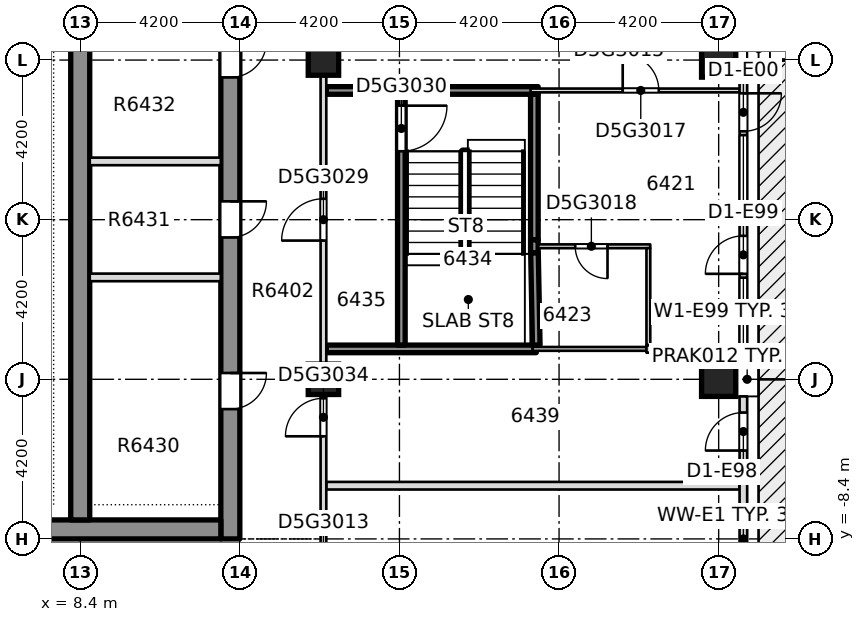
"""IFC4 building model, lengths in metres.
Left out: names, types, materials, properties, quantities, classifications, styles, units other than length and angle.
Written with IfcOpenShell. Run it as: python <this file> out.ifc"""

import sys

from ifc_helpers import new_model, si_unit, direction, frame, frame_2d, origin, origin_2d, place, context, subcontext, project, spatial, rectangle, extrude, element, fill, save


model = new_model("IFC4")
c1 = context("Model", 3, precision=1e-05, world=origin(), true_north=direction((0.0, 1.0)))
c2 = subcontext(c1, "Body", "Model", "MODEL_VIEW")
j1 = project(units=[si_unit("LENGTHUNIT", "METRE"), si_unit("PLANEANGLEUNIT", "RADIAN")], contexts=[c1])
p1 = place(None, origin())
s1 = spatial("IfcSite", under=j1, at=p1, CompositionType="ELEMENT")
p2 = place(p1, origin())
s2 = spatial("IfcBuilding", under=s1, at=p2, CompositionType="ELEMENT")
p3 = place(p2, frame((0.0, 0.0, 244.15)))
s3 = spatial("IfcBuildingStorey", under=s2, at=p3, CompositionType="ELEMENT", Elevation=244.15)
p4 = place(p3, frame((12.35, -8.4, -0.4), z_axis=(0.0, 0.0, 1.0), x_axis=(0.0, 1.0, 0.0)))
e1 = element("IfcWall", 1, at=p4, inside=s3, PredefinedType="SHEAR", context=c2, shape_type="SweptSolid", body=[
    extrude(rectangle(XDim=30.15, YDim=0.5, at=frame_2d((15.075, 0.0))), origin(), (0.0, 0.0, 1.0), 3.45),
])
p5 = place(p4, frame((3.416, 0.0, 0.4)))
e2 = element("IfcOpeningElement", 2, at=p5, cuts=e1, PredefinedType="OPENING", context=c2, shape_type="SweptSolid", body=[
    extrude(rectangle(XDim=0.95, YDim=2.1, at=frame_2d((0.475, 1.05))), frame((0.0, 0.26, 0.0), z_axis=(0.0, -1.0, 0.0), x_axis=(1.0, 0.0, 0.0)), (0.0, 0.0, 1.0), 0.52),
])
p6 = place(p4, frame((7.932, 0.0, 0.4)))
e3 = element("IfcOpeningElement", 3, at=p6, cuts=e1, PredefinedType="OPENING", context=c2, shape_type="SweptSolid", body=[
    extrude(rectangle(XDim=0.95, YDim=2.1, at=frame_2d((0.475, 1.05))), frame((0.0, 0.26, 0.0), z_axis=(0.0, -1.0, 0.0), x_axis=(1.0, 0.0, 0.0)), (0.0, 0.0, 1.0), 0.52),
])
p7 = place(p4, frame((12.144, 0.0, 0.4)))
e4 = element("IfcOpeningElement", 4, at=p7, cuts=e1, PredefinedType="OPENING", context=c2, shape_type="SweptSolid", body=[
    extrude(rectangle(XDim=0.95, YDim=2.1, at=frame_2d((0.475, 1.05))), frame((0.0, 0.26, 0.0), z_axis=(0.0, -1.0, 0.0), x_axis=(1.0, 0.0, 0.0)), (0.0, 0.0, 1.0), 0.52),
])
p8 = place(p4, frame((16.477, 0.0, 0.4)))
e5 = element("IfcOpeningElement", 5, at=p8, cuts=e1, PredefinedType="OPENING", context=c2, shape_type="SweptSolid", body=[
    extrude(rectangle(XDim=0.95, YDim=2.1, at=frame_2d((0.475, 1.05))), frame((0.0, 0.26, 0.0), z_axis=(0.0, -1.0, 0.0), x_axis=(1.0, 0.0, 0.0)), (0.0, 0.0, 1.0), 0.52),
])
p9 = place(p4, frame((23.605, 0.0, 0.4)))
e6 = element("IfcOpeningElement", 6, at=p9, cuts=e1, PredefinedType="OPENING", context=c2, shape_type="SweptSolid", body=[
    extrude(rectangle(XDim=0.95, YDim=2.1, at=frame_2d((0.475, 1.05))), frame((0.0, 0.26, 0.0), z_axis=(0.0, -1.0, 0.0), x_axis=(1.0, 0.0, 0.0)), (0.0, 0.0, 1.0), 0.52),
])
p10 = place(p4, frame((27.63, 0.0, 0.4)))
e7 = element("IfcOpeningElement", 7, at=p10, cuts=e1, PredefinedType="OPENING", context=c2, shape_type="SweptSolid", body=[
    extrude(rectangle(XDim=0.95, YDim=2.1, at=frame_2d((0.475, 1.05))), frame((0.0, 0.26, 0.0), z_axis=(0.0, -1.0, 0.0), x_axis=(1.0, 0.0, 0.0)), (0.0, 0.0, 1.0), 0.52),
])
p11 = place(p4, frame((19.3, 0.0, 0.4)))
e8 = element("IfcOpeningElement", 8, at=p11, cuts=e1, PredefinedType="OPENING", context=c2, shape_type="SweptSolid", body=[
    extrude(rectangle(XDim=1.2, YDim=2.1, at=frame_2d((0.6, 1.05))), frame((0.0, 0.26, 0.0), z_axis=(0.0, -1.0, 0.0), x_axis=(1.0, 0.0, 0.0)), (0.0, 0.0, 1.0), 0.52),
])
p12 = place(p3, frame((-12.1, -8.15, -0.4), z_axis=(0.0, 0.0, 1.0), x_axis=(1.0, 0.0, 0.0)))
e9 = element("IfcWall", 9, at=p12, inside=s3, PredefinedType="SHEAR", context=c2, shape_type="SweptSolid", body=[
    extrude(rectangle(XDim=24.2, YDim=0.5, at=frame_2d((12.1, 0.0))), origin(), (0.0, 0.0, 1.0), 3.45),
])
p13 = place(p12, frame((7.35, 0.0, 0.4)))
e10 = element("IfcOpeningElement", 10, at=p13, cuts=e9, PredefinedType="OPENING", context=c2, shape_type="SweptSolid", body=[
    extrude(rectangle(XDim=1.8, YDim=2.1, at=frame_2d((0.9, 1.05))), frame((0.0, 0.26, 0.0), z_axis=(0.0, -1.0, 0.0), x_axis=(1.0, 0.0, 0.0)), (0.0, 0.0, 1.0), 0.52),
])
p14 = place(p12, frame((15.05, 0.0, 0.4)))
e11 = element("IfcOpeningElement", 11, at=p14, cuts=e9, PredefinedType="OPENING", context=c2, shape_type="SweptSolid", body=[
    extrude(rectangle(XDim=1.8, YDim=2.1, at=frame_2d((0.9, 1.05))), frame((0.0, 0.26, 0.0), z_axis=(0.0, -1.0, 0.0), x_axis=(1.0, 0.0, 0.0)), (0.0, 0.0, 1.0), 0.52),
])
p15 = place(p3, frame((8.4, -7.9, -0.4), z_axis=(0.0, 0.0, 1.0), x_axis=(0.0, 1.0, 0.0)))
e12 = element("IfcWall", 12, at=p15, inside=s3, PredefinedType="SHEAR", context=c2, shape_type="SweptSolid", body=[
    extrude(rectangle(XDim=29.15, YDim=0.5, at=frame_2d((14.575, 0.0))), origin(), (0.0, 0.0, 1.0), 3.45),
])
p16 = place(p15, frame((18.8, 0.0, 0.4)))
e13 = element("IfcOpeningElement", 13, at=p16, cuts=e12, PredefinedType="OPENING", context=c2, shape_type="SweptSolid", body=[
    extrude(rectangle(XDim=1.2, YDim=2.1, at=frame_2d((0.6, 1.05))), frame((0.0, 0.26, 0.0), z_axis=(0.0, -1.0, 0.0), x_axis=(1.0, 0.0, 0.0)), (0.0, 0.0, 1.0), 0.52),
])
for number, where, z_axis, x_axis in (
    (14, (25.2, -4.2, -0.4), (0.0, 0.0, 1.0), (1.0, 0.0, 0.0)),
    (15, (25.2, 4.2, -0.4), (0.0, 0.0, 1.0), (1.0, 0.0, 0.0)),
):
    element("IfcColumn", number, at=place(p3, frame(where, z_axis=z_axis, x_axis=x_axis)), inside=s3, PredefinedType="COLUMN", context=c2, shape_type="SweptSolid", body=[
        extrude(rectangle(XDim=0.9, YDim=0.9, at=origin_2d()), origin(), (0.0, 0.0, 1.0), 3.45),
    ])
for number, where, z_axis, x_axis in (
    (16, (14.8, -4.2, -0.4), (0.0, 0.0, 1.0), (1.0, 0.0, 0.0)),
    (17, (14.8, 4.2, -0.4), (0.0, 0.0, 1.0), (1.0, 0.0, 0.0)),
):
    element("IfcColumn", number, at=place(p3, frame(where, z_axis=z_axis, x_axis=x_axis)), inside=s3, PredefinedType="COLUMN", context=c2, shape_type="SweptSolid", body=[
        extrude(rectangle(XDim=0.8, YDim=0.8, at=origin_2d()), origin(), (0.0, 0.0, 1.0), 3.45),
    ])
p17 = place(p3, frame((14.875, -7.0, 0.0), z_axis=(0.0, 0.0, 1.0), x_axis=(1.0, 0.0, 0.0)))
e18 = element("IfcWall", 18, at=p17, inside=s3, PredefinedType="PARTITIONING", context=c2, shape_type="SweptSolid", body=[
    extrude(rectangle(XDim=10.875, YDim=0.2, at=frame_2d((5.438, 0.0))), origin(), (0.0, 0.0, 1.0), 3.05),
])
p18 = place(p3, frame((14.875, -3.4, 0.0), z_axis=(0.0, 0.0, 1.0), x_axis=(1.0, 0.0, 0.0)))
e19 = element("IfcWall", 19, at=p18, inside=s3, PredefinedType="SOLIDWALL", context=c2, shape_type="SweptSolid", body=[
    extrude(rectangle(XDim=5.525, YDim=0.2, at=frame_2d((2.762, 0.0))), origin(), (0.0, 0.0, 1.0), 3.05),
])
p19 = place(p3, frame((20.3, -3.4, 0.0), z_axis=(0.0, 0.0, 1.0), x_axis=(1.0, 0.0, 0.0)))
e20 = element("IfcWall", 20, at=p19, inside=s3, PredefinedType="PARTITIONING", context=c2, shape_type="SweptSolid", body=[
    extrude(rectangle(XDim=3.1, YDim=0.1, at=frame_2d((1.55, 0.0))), origin(), (0.0, 0.0, 1.0), 3.05),
])
p20 = place(p3, frame((23.3, -3.4, 0.0), z_axis=(0.0, 0.0, 1.0), x_axis=(1.0, 0.0, 0.0)))
e21 = element("IfcWall", 21, at=p20, inside=s3, PredefinedType="PARTITIONING", context=c2, shape_type="SweptSolid", body=[
    extrude(rectangle(XDim=2.45, YDim=0.2, at=frame_2d((1.225, 0.0))), origin(), (0.0, 0.0, 1.0), 3.05),
])
p21 = place(p3, frame((20.45, -0.7, 0.0), z_axis=(0.0, 0.0, 1.0), x_axis=(1.0, 0.0, 0.0)))
e22 = element("IfcWall", 22, at=p21, inside=s3, PredefinedType="PARTITIONING", context=c2, shape_type="SweptSolid", body=[
    extrude(rectangle(XDim=2.95, YDim=0.1, at=frame_2d((1.475, 0.0))), origin(), (0.0, 0.0, 1.0), 3.05),
])
p22 = place(p21, frame((0.975, 0.0, 0.0)))
e23 = element("IfcOpeningElement", 23, at=p22, cuts=e22, PredefinedType="OPENING", context=c2, shape_type="SweptSolid", body=[
    extrude(rectangle(XDim=0.85, YDim=2.1, at=frame_2d((0.425, 1.05))), frame((0.0, 0.06, 0.0), z_axis=(0.0, -1.0, 0.0), x_axis=(1.0, 0.0, 0.0)), (0.0, 0.0, 1.0), 0.12),
])
p23 = place(p3, frame((14.875, 3.4, 0.0), z_axis=(0.0, 0.0, 1.0), x_axis=(1.0, 0.0, 0.0)))
e24 = element("IfcWall", 24, at=p23, inside=s3, PredefinedType="SOLIDWALL", context=c2, shape_type="SweptSolid", body=[
    extrude(rectangle(XDim=5.575, YDim=0.2, at=frame_2d((2.788, 0.0))), origin(), (0.0, 0.0, 1.0), 3.05),
])
p24 = place(p3, frame((20.25, 3.4, 0.0), z_axis=(0.0, 0.0, 1.0), x_axis=(1.0, 0.0, 0.0)))
e25 = element("IfcWall", 25, at=p24, inside=s3, PredefinedType="PARTITIONING", context=c2, shape_type="SweptSolid", body=[
    extrude(rectangle(XDim=5.5, YDim=0.1, at=frame_2d((2.75, 0.0))), origin(), (0.0, 0.0, 1.0), 3.05),
])
p25 = place(p24, frame((2.425, 0.0, 0.0)))
e26 = element("IfcOpeningElement", 26, at=p25, cuts=e25, PredefinedType="OPENING", context=c2, shape_type="SweptSolid", body=[
    extrude(rectangle(XDim=0.95, YDim=2.1, at=frame_2d((0.475, 1.05))), frame((0.0, 0.06, 0.0), z_axis=(0.0, -1.0, 0.0), x_axis=(1.0, 0.0, 0.0)), (0.0, 0.0, 1.0), 0.12),
])
p26 = place(p3, frame((14.8, -10.45, 0.0), z_axis=(0.0, 0.0, 1.0), x_axis=(0.0, 1.0, 0.0)))
e27 = element("IfcWall", 27, at=p26, inside=s3, PredefinedType="PARTITIONING", context=c2, shape_type="SweptSolid", body=[
    extrude(rectangle(XDim=19.03, YDim=0.15, at=frame_2d((9.515, 0.0))), origin(), (0.0, 0.0, 1.0), 3.05),
])
p27 = place(p26, frame((0.9, 0.0, 0.0)))
e28 = element("IfcOpeningElement", 28, at=p27, cuts=e27, PredefinedType="OPENING", context=c2, shape_type="SweptSolid", body=[
    extrude(rectangle(XDim=0.95, YDim=2.1, at=frame_2d((0.475, 1.05))), frame((0.0, 0.085, 0.0), z_axis=(0.0, -1.0, 0.0), x_axis=(1.0, 0.0, 0.0)), (0.0, 0.0, 1.0), 0.17),
])
p28 = place(p26, frame((15.965, 0.0, 0.0)))
e29 = element("IfcOpeningElement", 29, at=p28, cuts=e27, PredefinedType="OPENING", context=c2, shape_type="SweptSolid", body=[
    extrude(rectangle(XDim=1.0, YDim=2.1, at=frame_2d((0.5, 1.05))), frame((0.0, 0.085, 0.0), z_axis=(0.0, -1.0, 0.0), x_axis=(1.0, 0.0, 0.0)), (0.0, 0.0, 1.0), 0.17),
])
p29 = place(p26, frame((9.9, 0.0, 0.0)))
e30 = element("IfcOpeningElement", 30, at=p29, cuts=e27, PredefinedType="OPENING", context=c2, shape_type="SweptSolid", body=[
    extrude(rectangle(XDim=1.1, YDim=2.1, at=frame_2d((0.55, 1.05))), frame((0.0, 0.085, 0.0), z_axis=(0.0, -1.0, 0.0), x_axis=(1.0, 0.0, 0.0)), (0.0, 0.0, 1.0), 0.17),
])
p30 = place(p26, frame((4.75, 0.0, 0.0)))
e31 = element("IfcOpeningElement", 31, at=p30, cuts=e27, PredefinedType="OPENING", context=c2, shape_type="SweptSolid", body=[
    extrude(rectangle(XDim=1.0, YDim=2.1, at=frame_2d((0.5, 1.05))), frame((0.0, 0.085, 0.0), z_axis=(0.0, -1.0, 0.0), x_axis=(1.0, 0.0, 0.0)), (0.0, 0.0, 1.0), 0.17),
])
p31 = place(p3, frame((16.85, -3.3, 0.0), z_axis=(0.0, 0.0, 1.0), x_axis=(0.0, 1.0, 0.0)))
e32 = element("IfcWall", 32, at=p31, inside=s3, PredefinedType="SOLIDWALL", context=c2, shape_type="SweptSolid", body=[
    extrude(rectangle(XDim=6.6, YDim=0.2, at=frame_2d((3.3, 0.0))), origin(), (0.0, 0.0, 1.0), 3.05),
])
p32 = place(p31, frame((5.1, 0.0, 0.0)))
e33 = element("IfcOpeningElement", 33, at=p32, cuts=e32, PredefinedType="OPENING", context=c2, shape_type="SweptSolid", body=[
    extrude(rectangle(XDim=1.2, YDim=2.1, at=frame_2d((0.6, 1.05))), frame((0.0, 0.11, 0.0), z_axis=(0.0, -1.0, 0.0), x_axis=(1.0, 0.0, 0.0)), (0.0, 0.0, 1.0), 0.22),
])
p33 = place(p3, frame((20.4, -3.3, 0.0), z_axis=(0.0, 0.0, 1.0), x_axis=(-0.019287077816, 0.999813987014, 0.0)))
e34 = element("IfcWall", 34, at=p33, inside=s3, PredefinedType="SOLIDWALL", context=c2, shape_type="SweptSolid", body=[
    extrude(rectangle(XDim=2.43, YDim=0.2, at=frame_2d((1.215, 0.0))), origin(), (0.0, 0.0, 1.0), 3.05),
])
p34 = place(p3, frame((20.35, -0.53, 0.0), z_axis=(0.0, 0.0, 1.0), x_axis=(0.0, 1.0, 0.0)))
e35 = element("IfcWall", 35, at=p34, inside=s3, PredefinedType="SOLIDWALL", context=c2, shape_type="SweptSolid", body=[
    extrude(rectangle(XDim=3.83, YDim=0.2, at=frame_2d((1.915, 0.0))), origin(), (0.0, 0.0, 1.0), 3.05),
])
p35 = place(p3, frame((23.35, -3.3, 0.0), z_axis=(0.0, 0.0, 1.0), x_axis=(0.0, 1.0, 0.0)))
e36 = element("IfcWall", 36, at=p35, inside=s3, PredefinedType="PARTITIONING", context=c2, shape_type="SweptSolid", body=[
    extrude(rectangle(XDim=2.55, YDim=0.1, at=frame_2d((1.275, 0.0))), origin(), (0.0, 0.0, 1.0), 3.05),
])
p36 = place(p3, frame((25.85, -12.15, 0.0), z_axis=(0.0, 0.0, 1.0), x_axis=(0.0, 1.0, 0.0)))
e37 = element("IfcWall", 37, at=p36, inside=s3, PredefinedType="STANDARD", context=c2, shape_type="SweptSolid", body=[
    extrude(rectangle(XDim=7.5, YDim=0.2, at=frame_2d((3.75, 0.0))), origin(), (0.0, 0.0, 1.0), 3.05),
])
p37 = place(p36, frame((0.425, 0.0, 0.2)))
e38 = element("IfcOpeningElement", 38, at=p37, cuts=e37, PredefinedType="OPENING", context=c2, shape_type="SweptSolid", body=[
    extrude(rectangle(XDim=1.8, YDim=2.65, at=frame_2d((0.9, 1.325))), frame((0.0, 0.11, 0.0), z_axis=(0.0, -1.0, 0.0), x_axis=(1.0, 0.0, 0.0)), (0.0, 0.0, 1.0), 0.22),
])
p38 = place(p36, frame((2.325, 0.0, 0.0)))
e39 = element("IfcOpeningElement", 39, at=p38, cuts=e37, PredefinedType="OPENING", context=c2, shape_type="SweptSolid", body=[
    extrude(rectangle(XDim=1.0, YDim=2.4, at=frame_2d((0.5, 1.2))), frame((0.0, 0.11, 0.0), z_axis=(0.0, -1.0, 0.0), x_axis=(1.0, 0.0, 0.0)), (0.0, 0.0, 1.0), 0.22),
])
p39 = place(p36, frame((6.075, 0.0, 0.0)))
e40 = element("IfcOpeningElement", 40, at=p39, cuts=e37, PredefinedType="OPENING", context=c2, shape_type="SweptSolid", body=[
    extrude(rectangle(XDim=1.0, YDim=2.4, at=frame_2d((0.5, 1.2))), frame((0.0, 0.11, 0.0), z_axis=(0.0, -1.0, 0.0), x_axis=(1.0, 0.0, 0.0)), (0.0, 0.0, 1.0), 0.22),
])
p40 = place(p3, frame((25.85, -3.75, 0.0), z_axis=(0.0, 0.0, 1.0), x_axis=(0.0, 1.0, 0.0)))
e41 = element("IfcWall", 41, at=p40, inside=s3, PredefinedType="STANDARD", context=c2, shape_type="SweptSolid", body=[
    extrude(rectangle(XDim=7.5, YDim=0.2, at=frame_2d((3.75, 0.0))), origin(), (0.0, 0.0, 1.0), 3.05),
])
p41 = place(p40, frame((0.425, 0.0, 0.2)))
e42 = element("IfcOpeningElement", 42, at=p41, cuts=e41, PredefinedType="OPENING", context=c2, shape_type="SweptSolid", body=[
    extrude(rectangle(XDim=1.8, YDim=2.65, at=frame_2d((0.9, 1.325))), frame((0.0, 0.11, 0.0), z_axis=(0.0, -1.0, 0.0), x_axis=(1.0, 0.0, 0.0)), (0.0, 0.0, 1.0), 0.22),
])
p42 = place(p40, frame((2.325, 0.0, 0.0)))
e43 = element("IfcOpeningElement", 43, at=p42, cuts=e41, PredefinedType="OPENING", context=c2, shape_type="SweptSolid", body=[
    extrude(rectangle(XDim=1.0, YDim=2.4, at=frame_2d((0.5, 1.2))), frame((0.0, 0.11, 0.0), z_axis=(0.0, -1.0, 0.0), x_axis=(1.0, 0.0, 0.0)), (0.0, 0.0, 1.0), 0.22),
])
p43 = place(p40, frame((4.175, 0.0, 0.2)))
e44 = element("IfcOpeningElement", 44, at=p43, cuts=e41, PredefinedType="OPENING", context=c2, shape_type="SweptSolid", body=[
    extrude(rectangle(XDim=1.8, YDim=2.65, at=frame_2d((0.9, 1.325))), frame((0.0, 0.11, 0.0), z_axis=(0.0, -1.0, 0.0), x_axis=(1.0, 0.0, 0.0)), (0.0, 0.0, 1.0), 0.22),
])
p44 = place(p40, frame((6.075, 0.0, 0.0)))
e45 = element("IfcOpeningElement", 45, at=p44, cuts=e41, PredefinedType="OPENING", context=c2, shape_type="SweptSolid", body=[
    extrude(rectangle(XDim=1.0, YDim=2.4, at=frame_2d((0.5, 1.2))), frame((0.0, 0.11, 0.0), z_axis=(0.0, -1.0, 0.0), x_axis=(1.0, 0.0, 0.0)), (0.0, 0.0, 1.0), 0.22),
])
for number, where, z_axis, x_axis in (
    (46, (8.651, -1.519, 0.0), (0.0, 0.0, 1.0), (1.0, 0.0, 0.0)),
    (47, (8.651, 1.533, 0.0), (0.0, 0.0, 1.0), (1.0, 0.0, 0.0)),
):
    element("IfcWall", number, at=place(p3, frame(where, z_axis=z_axis, x_axis=x_axis)), inside=s3, PredefinedType="PARTITIONING", context=c2, shape_type="SweptSolid", body=[
        extrude(rectangle(XDim=3.448, YDim=0.2, at=frame_2d((1.724, 0.0))), origin(), (0.0, 0.0, 1.0), 3.05),
    ])
p45 = place(p3, frame((20.35, -0.87, 0.0), z_axis=(0.0, 0.0, 1.0), x_axis=(0.0, 1.0, 0.0)))
e48 = element("IfcWall", 48, at=p45, inside=s3, PredefinedType="SOLIDWALL", context=c2, shape_type="SweptSolid", body=[
    extrude(rectangle(XDim=0.34, YDim=0.2, at=frame_2d((0.17, 0.0))), origin(), (0.0, 0.0, 1.0), 3.05),
])
p46 = place(p25, origin())
e49 = element("IfcDoor", 49, at=p46, inside=s3, OperationType="SINGLE_SWING_LEFT", PredefinedType="DOOR", context=c2, shape_type="SweptSolid", body=[
    extrude(rectangle(XDim=0.95, YDim=2.1, at=frame_2d((0.475, 1.05))), frame((0.0, 0.025, 0.0), z_axis=(0.0, -1.0, 0.0), x_axis=(1.0, 0.0, 0.0)), (0.0, 0.0, 1.0), 0.05),
])
fill(e26, e49)
p47 = place(p22, origin())
e50 = element("IfcDoor", 50, at=p47, inside=s3, OperationType="SINGLE_SWING_RIGHT", PredefinedType="DOOR", context=c2, shape_type="SweptSolid", body=[
    extrude(rectangle(XDim=0.85, YDim=2.1, at=frame_2d((0.425, 1.05))), frame((0.0, 0.025, 0.0), z_axis=(0.0, -1.0, 0.0), x_axis=(1.0, 0.0, 0.0)), (0.0, 0.0, 1.0), 0.05),
])
fill(e23, e50)
p48 = place(p29, origin())
e51 = element("IfcDoor", 51, at=p48, inside=s3, OperationType="SINGLE_SWING_LEFT", PredefinedType="DOOR", context=c2, shape_type="SweptSolid", body=[
    extrude(rectangle(XDim=1.1, YDim=2.1, at=frame_2d((0.55, 1.05))), frame((0.0, 0.025, 0.0), z_axis=(0.0, -1.0, 0.0), x_axis=(1.0, 0.0, 0.0)), (0.0, 0.0, 1.0), 0.05),
])
fill(e30, e51)
p49 = place(p32, origin())
e52 = element("IfcDoor", 52, at=p49, inside=s3, OperationType="SINGLE_SWING_LEFT", PredefinedType="DOOR", context=c2, shape_type="SweptSolid", body=[
    extrude(rectangle(XDim=1.2, YDim=2.1, at=frame_2d((0.6, 1.05))), frame((0.0, 0.025, 0.0), z_axis=(0.0, -1.0, 0.0), x_axis=(1.0, 0.0, 0.0)), (0.0, 0.0, 1.0), 0.05),
])
fill(e33, e52)
p50 = place(p30, origin())
e53 = element("IfcDoor", 53, at=p50, inside=s3, OperationType="SINGLE_SWING_RIGHT", PredefinedType="DOOR", context=c2, shape_type="SweptSolid", body=[
    extrude(rectangle(XDim=1.0, YDim=2.1, at=frame_2d((0.5, 1.05))), frame((0.0, 0.025, 0.0), z_axis=(0.0, -1.0, 0.0), x_axis=(1.0, 0.0, 0.0)), (0.0, 0.0, 1.0), 0.05),
])
fill(e31, e53)
p51 = place(p39, origin())
e54 = element("IfcDoor", 54, at=p51, inside=s3, OperationType="SINGLE_SWING_LEFT", PredefinedType="DOOR", context=c2, shape_type="SweptSolid", body=[
    extrude(rectangle(XDim=1.0, YDim=2.4, at=frame_2d((0.5, 1.2))), frame((0.0, 0.025, 0.0), z_axis=(0.0, -1.0, 0.0), x_axis=(1.0, 0.0, 0.0)), (0.0, 0.0, 1.0), 0.05),
])
fill(e40, e54)
p52 = place(p41, origin())
e55 = element("IfcWindow", 55, at=p52, inside=s3, PartitioningType="SINGLE_PANEL", PredefinedType="WINDOW", context=c2, shape_type="SweptSolid", body=[
    extrude(rectangle(XDim=1.8, YDim=2.65, at=frame_2d((0.9, 1.325))), frame((0.0, 0.03, 0.0), z_axis=(0.0, -1.0, 0.0), x_axis=(1.0, 0.0, 0.0)), (0.0, 0.0, 1.0), 0.06),
])
fill(e42, e55)
p53 = place(p42, origin())
e56 = element("IfcDoor", 56, at=p53, inside=s3, OperationType="SINGLE_SWING_LEFT", PredefinedType="DOOR", context=c2, shape_type="SweptSolid", body=[
    extrude(rectangle(XDim=1.0, YDim=2.4, at=frame_2d((0.5, 1.2))), frame((0.0, 0.025, 0.0), z_axis=(0.0, -1.0, 0.0), x_axis=(1.0, 0.0, 0.0)), (0.0, 0.0, 1.0), 0.05),
])
fill(e43, e56)
p54 = place(p43, origin())
e57 = element("IfcWindow", 57, at=p54, inside=s3, PartitioningType="SINGLE_PANEL", PredefinedType="WINDOW", context=c2, shape_type="SweptSolid", body=[
    extrude(rectangle(XDim=1.8, YDim=2.65, at=frame_2d((0.9, 1.325))), frame((0.0, 0.03, 0.0), z_axis=(0.0, -1.0, 0.0), x_axis=(1.0, 0.0, 0.0)), (0.0, 0.0, 1.0), 0.06),
])
fill(e44, e57)
p55 = place(p44, origin())
e58 = element("IfcDoor", 58, at=p55, inside=s3, OperationType="SINGLE_SWING_LEFT", PredefinedType="DOOR", context=c2, shape_type="SweptSolid", body=[
    extrude(rectangle(XDim=1.0, YDim=2.4, at=frame_2d((0.5, 1.2))), frame((0.0, 0.025, 0.0), z_axis=(0.0, -1.0, 0.0), x_axis=(1.0, 0.0, 0.0)), (0.0, 0.0, 1.0), 0.05),
])
fill(e45, e58)
p56 = place(p5, origin())
e59 = element("IfcDoor", 59, at=p56, inside=s3, OperationType="SINGLE_SWING_LEFT", PredefinedType="DOOR", context=c2, shape_type="SweptSolid", body=[
    extrude(rectangle(XDim=0.95, YDim=2.1, at=frame_2d((0.475, 1.05))), frame((0.0, 0.025, 0.0), z_axis=(0.0, -1.0, 0.0), x_axis=(1.0, 0.0, 0.0)), (0.0, 0.0, 1.0), 0.05),
])
fill(e2, e59)
p57 = place(p6, origin())
e60 = element("IfcDoor", 60, at=p57, inside=s3, OperationType="SINGLE_SWING_LEFT", PredefinedType="DOOR", context=c2, shape_type="SweptSolid", body=[
    extrude(rectangle(XDim=0.95, YDim=2.1, at=frame_2d((0.475, 1.05))), frame((0.0, 0.025, 0.0), z_axis=(0.0, -1.0, 0.0), x_axis=(1.0, 0.0, 0.0)), (0.0, 0.0, 1.0), 0.05),
])
fill(e3, e60)
p58 = place(p7, origin())
e61 = element("IfcDoor", 61, at=p58, inside=s3, OperationType="SINGLE_SWING_LEFT", PredefinedType="DOOR", context=c2, shape_type="SweptSolid", body=[
    extrude(rectangle(XDim=0.95, YDim=2.1, at=frame_2d((0.475, 1.05))), frame((0.0, 0.025, 0.0), z_axis=(0.0, -1.0, 0.0), x_axis=(1.0, 0.0, 0.0)), (0.0, 0.0, 1.0), 0.05),
])
fill(e4, e61)
save(model, sys.argv[1])
